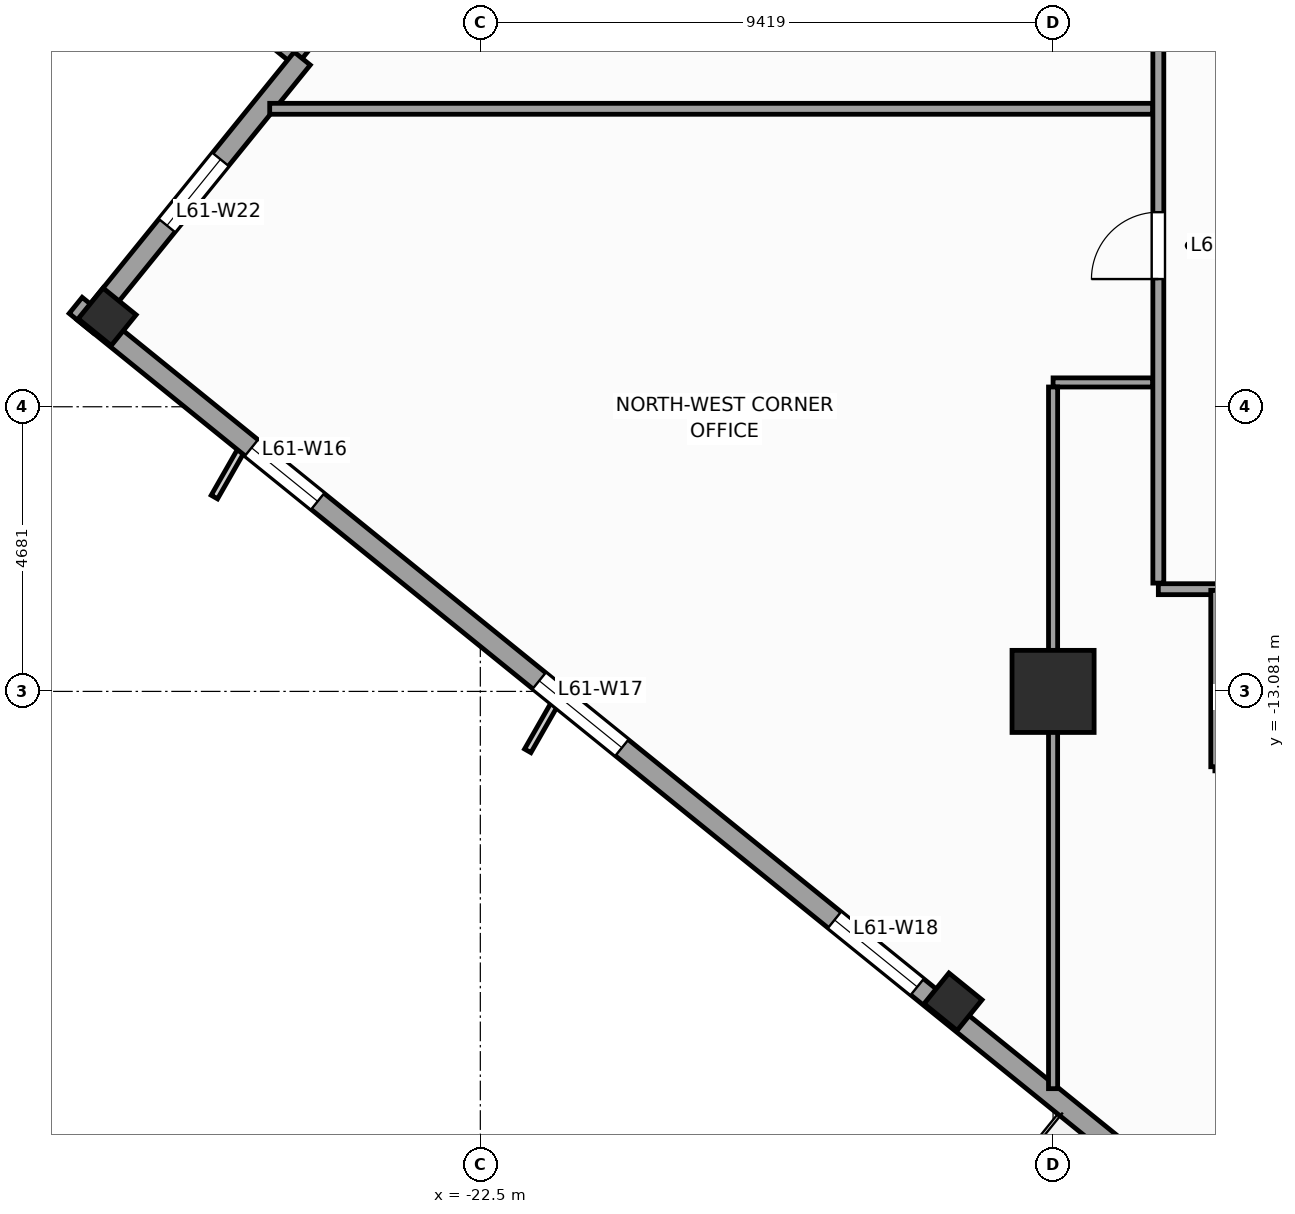
"""IFC4 building model, lengths in metres.
Left out: names, types, materials, properties, quantities, classifications, styles, units other than length and angle.
Written with IfcOpenShell. Run it as: python <this file> out.ifc"""

import sys

from ifc_helpers import new_model, si_unit, direction, frame, frame_2d, origin, origin_2d, place, context, subcontext, project, spatial, rectangle, extrude, source, transform, mapped, element, fill, save


model = new_model("IFC4")
c1 = context("Model", 3, precision=1e-05, world=origin(), true_north=direction((0.0, 1.0)))
c2 = subcontext(c1, "Body", "Model", "MODEL_VIEW")
j1 = project(units=[si_unit("LENGTHUNIT", "METRE"), si_unit("PLANEANGLEUNIT", "RADIAN")], contexts=[c1])
p1 = place(None, origin())
s1 = spatial("IfcSite", under=j1, at=p1, CompositionType="ELEMENT")
p2 = place(p1, origin())
s2 = spatial("IfcBuilding", under=s1, at=p2, CompositionType="ELEMENT")
p3 = place(p2, frame((0.0, 0.0, 252.4)))
s3 = spatial("IfcBuildingStorey", under=s2, at=p3, CompositionType="ELEMENT", Elevation=252.4)
m1 = source(origin(), c2, "Body", "SweptSolid", [
    extrude(rectangle(XDim=1.35, YDim=1.35, at=origin_2d()), origin(), (0.0, 0.0, 1.0), 3.9),
])
p4 = place(p3, frame((-13.081, -13.081, 0.0), z_axis=(0.0, 0.0, 1.0), x_axis=(1.0, 0.0, 0.0)))
e1 = element("IfcColumn", 1, at=p4, inside=s3, PredefinedType="COLUMN", context=c2, shape_type="MappedRepresentation", body=[
    mapped(m1, transform((0.0, 0.0, 0.0), scale=1.0)),
])
m2 = source(origin(), c2, "Body", "SweptSolid", [
    extrude(rectangle(XDim=0.65, YDim=0.7, at=origin_2d()), origin(), (0.0, 0.0, 1.0), 3.9),
])
for number, where, z_axis, x_axis in (
    (2, (-28.637, -6.92, 0.0), (0.0, 0.0, 1.0), (0.629, 0.777, 0.0)),
    (3, (-14.726, -18.185, 0.0), (0.0, 0.0, 1.0), (0.629, 0.777, 0.0)),
):
    element("IfcColumn", number, at=place(p3, frame(where, z_axis=z_axis, x_axis=x_axis)), inside=s3, PredefinedType="COLUMN", context=c2, shape_type="MappedRepresentation", body=[
        mapped(m2, transform((0.0, 0.0, 0.0), scale=1.0)),
    ])
p5 = place(p3, frame((-29.703, 0.789, 0.0), z_axis=(0.0, 0.0, 1.0), x_axis=(0.77714355312, -0.629323365087, 0.0)))
e4 = element("IfcWall", 4, at=p5, inside=s3, PredefinedType="STANDARD", context=c2, shape_type="SweptSolid", body=[
    extrude(rectangle(XDim=5.5, YDim=0.34, at=frame_2d((2.75, 0.0))), origin(), (0.0, 0.0, 1.0), 3.66),
])
p6 = place(p3, frame((-25.429, -2.673, 0.0), z_axis=(0.0, 0.0, 1.0), x_axis=(-0.629299794138, -0.777162640055, 0.0)))
e5 = element("IfcWall", 5, at=p6, inside=s3, PredefinedType="STANDARD", context=c2, shape_type="SweptSolid", body=[
    extrude(rectangle(XDim=5.67, YDim=0.34, at=frame_2d((2.835, 0.0))), origin(), (0.0, 0.0, 1.0), 3.66),
])
p7 = place(p6, frame((2.135, 0.0, 0.48)))
e6 = element("IfcOpeningElement", 6, at=p7, cuts=e5, PredefinedType="OPENING", context=c2, shape_type="SweptSolid", body=[
    extrude(rectangle(XDim=1.4, YDim=2.4, at=frame_2d((0.7, 1.2))), frame((0.0, 0.18, 0.0), z_axis=(0.0, -1.0, 0.0), x_axis=(1.0, 0.0, 0.0)), (0.0, 0.0, 1.0), 0.36),
])
p8 = place(p3, frame((-29.154, -6.733, 0.0), z_axis=(0.0, 0.0, 1.0), x_axis=(0.77714192302, -0.629325378072, 0.0)))
e7 = element("IfcWall", 7, at=p8, inside=s3, PredefinedType="STANDARD", context=c2, shape_type="SweptSolid", body=[
    extrude(rectangle(XDim=36.84, YDim=0.34, at=frame_2d((18.42, 0.0))), origin(), (0.0, 0.0, 1.0), 2.96),
])
p9 = place(p8, frame((23.495, 0.0, 0.0)))
e8 = element("IfcOpeningElement", 8, at=p9, cuts=e7, PredefinedType="OPENING", context=c2, shape_type="SweptSolid", body=[
    extrude(rectangle(XDim=1.05, YDim=2.25, at=frame_2d((0.525, 1.125))), frame((0.0, 0.18, 0.0), z_axis=(0.0, -1.0, 0.0), x_axis=(1.0, 0.0, 0.0)), (0.0, 0.0, 1.0), 0.36),
])
p10 = place(p8, frame((3.721, 0.0, 0.48)))
e9 = element("IfcOpeningElement", 9, at=p10, cuts=e7, PredefinedType="OPENING", context=c2, shape_type="SweptSolid", body=[
    extrude(rectangle(XDim=1.4, YDim=2.4, at=frame_2d((0.7, 1.2))), frame((0.0, 0.18, 0.0), z_axis=(0.0, -1.0, 0.0), x_axis=(1.0, 0.0, 0.0)), (0.0, 0.0, 1.0), 0.36),
])
p11 = place(p8, frame((9.809, 0.0, 0.58)))
e10 = element("IfcOpeningElement", 10, at=p11, cuts=e7, PredefinedType="OPENING", context=c2, shape_type="SweptSolid", body=[
    extrude(rectangle(XDim=1.75, YDim=2.3, at=frame_2d((0.875, 1.15))), frame((0.0, 0.18, 0.0), z_axis=(0.0, -1.0, 0.0), x_axis=(1.0, 0.0, 0.0)), (0.0, 0.0, 1.0), 0.36),
])
p12 = place(p8, frame((16.058, 0.0, 0.58)))
e11 = element("IfcOpeningElement", 11, at=p12, cuts=e7, PredefinedType="OPENING", context=c2, shape_type="SweptSolid", body=[
    extrude(rectangle(XDim=1.75, YDim=2.3, at=frame_2d((0.875, 1.15))), frame((0.0, 0.18, 0.0), z_axis=(0.0, -1.0, 0.0), x_axis=(1.0, 0.0, 0.0)), (0.0, 0.0, 1.0), 0.36),
])
p13 = place(p8, frame((25.676, 0.0, 0.58)))
e12 = element("IfcOpeningElement", 12, at=p13, cuts=e7, PredefinedType="OPENING", context=c2, shape_type="SweptSolid", body=[
    extrude(rectangle(XDim=1.75, YDim=2.3, at=frame_2d((0.875, 1.15))), frame((0.0, 0.18, 0.0), z_axis=(0.0, -1.0, 0.0), x_axis=(1.0, 0.0, 0.0)), (0.0, 0.0, 1.0), 0.36),
])
p14 = place(p8, frame((30.982, 0.0, 0.48)))
e13 = element("IfcOpeningElement", 13, at=p14, cuts=e7, PredefinedType="OPENING", context=c2, shape_type="SweptSolid", body=[
    extrude(rectangle(XDim=1.4, YDim=2.4, at=frame_2d((0.7, 1.2))), frame((0.0, 0.18, 0.0), z_axis=(0.0, -1.0, 0.0), x_axis=(1.0, 0.0, 0.0)), (0.0, 0.0, 1.0), 0.36),
])
p15 = place(p3, frame((-11.35, -11.4, 0.0), z_axis=(0.0, 0.0, 1.0), x_axis=(1.0, 0.0, 0.0)))
e14 = element("IfcWall", 14, at=p15, inside=s3, PredefinedType="PARTITIONING", context=c2, shape_type="SweptSolid", body=[
    extrude(rectangle(XDim=21.65, YDim=0.18, at=frame_2d((10.825, 0.0))), origin(), (0.0, 0.0, 1.0), 3.66),
])
p16 = place(p15, frame((1.455, 0.0, 0.0)))
e15 = element("IfcOpeningElement", 15, at=p16, cuts=e14, PredefinedType="OPENING", context=c2, shape_type="SweptSolid", body=[
    extrude(rectangle(XDim=0.95, YDim=2.1, at=frame_2d((0.475, 1.05))), frame((0.0, 0.1, 0.0), z_axis=(0.0, -1.0, 0.0), x_axis=(1.0, 0.0, 0.0)), (0.0, 0.0, 1.0), 0.2),
])
p17 = place(p15, frame((12.311, 0.0, 0.0)))
e16 = element("IfcOpeningElement", 16, at=p17, cuts=e14, PredefinedType="OPENING", context=c2, shape_type="SweptSolid", body=[
    extrude(rectangle(XDim=0.95, YDim=2.1, at=frame_2d((0.475, 1.05))), frame((0.0, 0.1, 0.0), z_axis=(0.0, -1.0, 0.0), x_axis=(1.0, 0.0, 0.0)), (0.0, 0.0, 1.0), 0.2),
])
p18 = place(p15, frame((17.06, 0.0, 0.0)))
e17 = element("IfcOpeningElement", 17, at=p18, cuts=e14, PredefinedType="OPENING", context=c2, shape_type="SweptSolid", body=[
    extrude(rectangle(XDim=1.1, YDim=2.2, at=frame_2d((0.55, 1.1))), frame((0.0, 0.1, 0.0), z_axis=(0.0, -1.0, 0.0), x_axis=(1.0, 0.0, 0.0)), (0.0, 0.0, 1.0), 0.2),
])
p19 = place(p15, frame((6.584, 0.0, 0.0)))
e18 = element("IfcOpeningElement", 18, at=p19, cuts=e14, PredefinedType="OPENING", context=c2, shape_type="SweptSolid", body=[
    extrude(rectangle(XDim=1.1, YDim=2.2, at=frame_2d((0.55, 1.1))), frame((0.0, 0.1, 0.0), z_axis=(0.0, -1.0, 0.0), x_axis=(1.0, 0.0, 0.0)), (0.0, 0.0, 1.0), 0.2),
])
p20 = place(p3, frame((-11.35, -11.3, 0.0), z_axis=(0.0, 0.0, 1.0), x_axis=(0.0, 1.0, 0.0)))
e19 = element("IfcWall", 19, at=p20, inside=s3, PredefinedType="PARTITIONING", context=c2, shape_type="SweptSolid", body=[
    extrude(rectangle(XDim=23.65, YDim=0.18, at=frame_2d((11.825, 0.0))), origin(), (0.0, 0.0, 1.0), 3.66),
])
p21 = place(p20, frame((13.1, 0.0, 0.0)))
e20 = element("IfcOpeningElement", 20, at=p21, cuts=e19, PredefinedType="OPENING", context=c2, shape_type="SweptSolid", body=[
    extrude(rectangle(XDim=1.1, YDim=2.2, at=frame_2d((0.55, 1.1))), frame((0.0, 0.1, 0.0), z_axis=(0.0, -1.0, 0.0), x_axis=(1.0, 0.0, 0.0)), (0.0, 0.0, 1.0), 0.2),
])
p22 = place(p20, frame((16.85, 0.0, 0.0)))
e21 = element("IfcOpeningElement", 21, at=p22, cuts=e19, PredefinedType="OPENING", context=c2, shape_type="SweptSolid", body=[
    extrude(rectangle(XDim=1.1, YDim=2.2, at=frame_2d((0.55, 1.1))), frame((0.0, 0.1, 0.0), z_axis=(0.0, -1.0, 0.0), x_axis=(1.0, 0.0, 0.0)), (0.0, 0.0, 1.0), 0.2),
])
p23 = place(p20, frame((5.0, 0.0, 0.0)))
e22 = element("IfcOpeningElement", 22, at=p23, cuts=e19, PredefinedType="OPENING", context=c2, shape_type="SweptSolid", body=[
    extrude(rectangle(XDim=1.1, YDim=2.2, at=frame_2d((0.55, 1.1))), frame((0.0, 0.1, 0.0), z_axis=(0.0, -1.0, 0.0), x_axis=(1.0, 0.0, 0.0)), (0.0, 0.0, 1.0), 0.2),
])
p24 = place(p20, frame((9.25, 0.0, 0.0)))
e23 = element("IfcOpeningElement", 23, at=p24, cuts=e19, PredefinedType="OPENING", context=c2, shape_type="SweptSolid", body=[
    extrude(rectangle(XDim=1.1, YDim=2.2, at=frame_2d((0.55, 1.1))), frame((0.0, 0.1, 0.0), z_axis=(0.0, -1.0, 0.0), x_axis=(1.0, 0.0, 0.0)), (0.0, 0.0, 1.0), 0.2),
])
p25 = place(p3, frame((-11.445, -3.5, 0.0), z_axis=(0.0, 0.0, 1.0), x_axis=(-1.0, 0.0, 0.0)))
e24 = element("IfcWall", 24, at=p25, inside=s3, PredefinedType="PARTITIONING", context=c2, shape_type="SweptSolid", body=[
    extrude(rectangle(XDim=14.519, YDim=0.18, at=frame_2d((7.259, 0.0))), origin(), (0.0, 0.0, 1.0), 3.66),
])
p26 = place(p3, frame((-11.445, -8.0, 0.0), z_axis=(0.0, 0.0, 1.0), x_axis=(-1.0, 0.0, 0.0)))
e25 = element("IfcWall", 25, at=p26, inside=s3, PredefinedType="PARTITIONING", context=c2, shape_type="SweptSolid", body=[
    extrude(rectangle(XDim=1.636, YDim=0.15, at=frame_2d((0.818, 0.0))), origin(), (0.0, 0.0, 1.0), 3.66),
])
p27 = place(p3, frame((-13.081, -8.075, 0.0), z_axis=(0.0, 0.0, 1.0), x_axis=(0.0, -1.0, 0.0)))
e26 = element("IfcWall", 26, at=p27, inside=s3, PredefinedType="PARTITIONING", context=c2, shape_type="SweptSolid", body=[
    extrude(rectangle(XDim=11.539, YDim=0.15, at=frame_2d((5.77, 0.0))), origin(), (0.0, 0.0, 1.0), 2.76),
])
p28 = place(p3, frame((-10.42, -14.32, 0.0), z_axis=(0.0, 0.0, 1.0), x_axis=(0.0, 1.0, 0.0)))
e27 = element("IfcWall", 27, at=p28, inside=s3, PredefinedType="PARTITIONING", context=c2, shape_type="SweptSolid", body=[
    extrude(rectangle(XDim=2.9, YDim=0.135, at=frame_2d((1.45, 0.0))), origin(), (0.0, 0.0, 1.0), 3.66),
])
m3 = source(origin(), c2, "Body", "SweptSolid", [
    extrude(rectangle(XDim=1.4, YDim=2.4, at=frame_2d((0.7, 1.2))), frame((0.0, 0.03, 0.0), z_axis=(0.0, -1.0, 0.0), x_axis=(1.0, 0.0, 0.0)), (0.0, 0.0, 1.0), 0.06),
])
p29 = place(p10, origin())
e28 = element("IfcWindow", 28, at=p29, inside=s3, PartitioningType="SINGLE_PANEL", PredefinedType="WINDOW", context=c2, shape_type="MappedRepresentation", body=[
    mapped(m3, transform((0.0, 0.0, 0.0), scale=1.0)),
])
fill(e9, e28)
m4 = source(origin(), c2, "Body", "SweptSolid", [
    extrude(rectangle(XDim=1.75, YDim=2.3, at=frame_2d((0.875, 1.15))), frame((0.0, 0.03, 0.0), z_axis=(0.0, -1.0, 0.0), x_axis=(1.0, 0.0, 0.0)), (0.0, 0.0, 1.0), 0.06),
])
p30 = place(p11, origin())
e29 = element("IfcWindow", 29, at=p30, inside=s3, PartitioningType="SINGLE_PANEL", PredefinedType="WINDOW", context=c2, shape_type="MappedRepresentation", body=[
    mapped(m4, transform((0.0, 0.0, 0.0), scale=1.0)),
])
fill(e10, e29)
p31 = place(p12, origin())
e30 = element("IfcWindow", 30, at=p31, inside=s3, PartitioningType="SINGLE_PANEL", PredefinedType="WINDOW", context=c2, shape_type="MappedRepresentation", body=[
    mapped(m4, transform((0.0, 0.0, 0.0), scale=1.0)),
])
fill(e11, e30)
p32 = place(p7, origin())
e31 = element("IfcWindow", 31, at=p32, inside=s3, PartitioningType="SINGLE_PANEL", PredefinedType="WINDOW", context=c2, shape_type="MappedRepresentation", body=[
    mapped(m3, transform((0.0, 0.0, 0.0), scale=1.0)),
])
fill(e6, e31)
m5 = source(origin(), c2, "Body", "SweptSolid", [
    extrude(rectangle(XDim=1.1, YDim=2.2, at=frame_2d((0.55, 1.1))), frame((0.0, 0.025, 0.0), z_axis=(0.0, -1.0, 0.0), x_axis=(1.0, 0.0, 0.0)), (0.0, 0.0, 1.0), 0.05),
])
p33 = place(p23, origin())
e32 = element("IfcDoor", 32, at=p33, inside=s3, OperationType="SINGLE_SWING_LEFT", PredefinedType="DOOR", context=c2, shape_type="MappedRepresentation", body=[
    mapped(m5, transform((0.0, 0.0, 0.0), scale=1.0)),
])
fill(e22, e32)
save(model, sys.argv[1])
